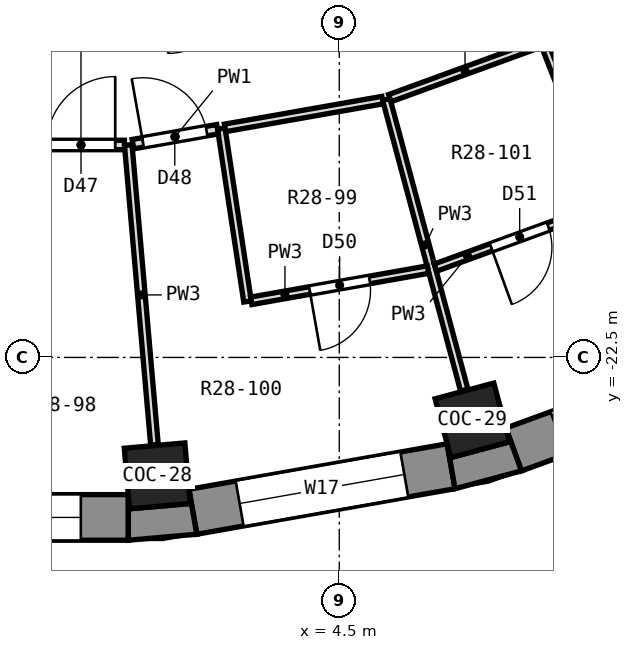
"""IFC4 building model, lengths in metres.
Left out: names, types, materials, properties, quantities, classifications, styles, units other than length and angle.
Written with IfcOpenShell. Run it as: python <this file> out.ifc"""

import sys

from ifc_helpers import new_model, si_unit, direction, frame, frame_2d, origin, origin_2d, place, context, subcontext, project, spatial, polyline, rectangle, outline, extrude, element, fill, save


model = new_model("IFC4")
c1 = context("Model", 3, precision=1e-05, world=origin(), true_north=direction((0.0, 1.0)))
c2 = subcontext(c1, "Body", "Model", "MODEL_VIEW")
j1 = project(units=[si_unit("LENGTHUNIT", "METRE"), si_unit("PLANEANGLEUNIT", "RADIAN")], contexts=[c1])
p1 = place(None, origin())
s1 = spatial("IfcSite", under=j1, at=p1, CompositionType="ELEMENT")
p2 = place(p1, origin())
s2 = spatial("IfcBuilding", under=s1, at=p2, CompositionType="ELEMENT")
p3 = place(p2, frame((0.0, 0.0, 190.5)))
s3 = spatial("IfcBuildingStorey", under=s2, at=p3, CompositionType="ELEMENT", Elevation=190.5)
for number, where, z_axis, x_axis in (
    (1, (2.105, -24.058, 0.0), (0.0, 0.0, 1.0), (0.087, -0.996, 0.0)),
    (2, (6.25, -23.327, 0.0), (0.0, 0.0, 1.0), (0.259, -0.966, 0.0)),
):
    element("IfcColumn", number, at=place(p3, frame(where, z_axis=z_axis, x_axis=x_axis)), inside=s3, PredefinedType="COLUMN", context=c2, shape_type="SweptSolid", body=[
        extrude(rectangle(XDim=0.8, YDim=0.8, at=origin_2d()), origin(), (0.0, 0.0, 1.0), 3.3),
    ])
p4 = place(p3, frame((-1.725, -24.605, 0.0), z_axis=(0.0, 0.0, 1.0), x_axis=(1.0, 0.0, 0.0)))
e3 = element("IfcWall", 3, at=p4, inside=s3, PredefinedType="SOLIDWALL", context=c2, shape_type="SweptSolid", body=[
    extrude(rectangle(XDim=3.45, YDim=0.6, at=frame_2d((1.725, 0.0))), origin(), (0.0, 0.0, 1.0), 2.85),
])
p5 = place(p4, frame((0.625, 0.0, 0.9)))
e4 = element("IfcOpeningElement", 4, at=p5, cuts=e3, PredefinedType="OPENING", context=c2, shape_type="SweptSolid", body=[
    extrude(rectangle(XDim=2.2, YDim=1.8, at=frame_2d((1.1, 0.9))), frame((0.0, 0.312, 0.0), z_axis=(0.0, -1.0, 0.0), x_axis=(1.0, 0.0, 0.0)), (0.0, 0.0, 1.0), 0.624),
])
p6 = place(p3, frame((2.574, -24.531, 0.0), z_axis=(0.0, 0.0, 1.0), x_axis=(0.984814892183, 0.173607684551, 0.0)))
e5 = element("IfcWall", 5, at=p6, inside=s3, PredefinedType="SOLIDWALL", context=c2, shape_type="SweptSolid", body=[
    extrude(rectangle(XDim=3.45, YDim=0.6, at=frame_2d((1.725, 0.0))), origin(), (0.0, 0.0, 1.0), 2.85),
])
p7 = place(p6, frame((0.625, 0.0, 0.9)))
e6 = element("IfcOpeningElement", 6, at=p7, cuts=e5, PredefinedType="OPENING", context=c2, shape_type="SweptSolid", body=[
    extrude(rectangle(XDim=2.2, YDim=1.8, at=frame_2d((1.1, 0.9))), frame((0.0, 0.312, 0.0), z_axis=(0.0, -1.0, 0.0), x_axis=(1.0, 0.0, 0.0)), (0.0, 0.0, 1.0), 0.624),
])
p8 = place(p3, frame((6.794, -23.711, 0.0), z_axis=(0.0, 0.0, 1.0), x_axis=(0.93968799822, 0.342032843455, 0.0)))
e7 = element("IfcWall", 7, at=p8, inside=s3, PredefinedType="SOLIDWALL", context=c2, shape_type="SweptSolid", body=[
    extrude(rectangle(XDim=3.45, YDim=0.6, at=frame_2d((1.725, 0.0))), origin(), (0.0, 0.0, 1.0), 2.85),
])
p9 = place(p8, frame((0.625, 0.0, 0.9)))
e8 = element("IfcOpeningElement", 8, at=p9, cuts=e7, PredefinedType="OPENING", context=c2, shape_type="SweptSolid", body=[
    extrude(rectangle(XDim=2.2, YDim=1.8, at=frame_2d((1.1, 0.9))), frame((0.0, 0.312, 0.0), z_axis=(0.0, -1.0, 0.0), x_axis=(1.0, 0.0, 0.0)), (0.0, 0.0, 1.0), 0.624),
])
p10 = place(p3, origin())
e9 = element("IfcWall", 9, at=p10, inside=s3, PredefinedType="SOLIDWALL", context=c2, shape_type="SweptSolid", body=[
    extrude(outline(polyline([(1.725, -24.905), (2.626, -24.826), (2.522, -24.235), (2.538, -24.422), (1.741, -24.491), (1.725, -24.305), (1.725, -24.905)])), origin(), (0.0, 0.0, 1.0), 2.85),
])
p11 = place(p3, origin())
e10 = element("IfcWall", 10, at=p11, inside=s3, PredefinedType="SOLIDWALL", context=c2, shape_type="SweptSolid", body=[
    extrude(outline(polyline([(6.023, -24.227), (6.897, -23.993), (6.692, -23.429), (6.74, -23.61), (5.968, -23.817), (5.919, -23.636), (6.023, -24.227)])), origin(), (0.0, 0.0, 1.0), 2.85),
])
p12 = place(p3, frame((1.724, -19.705, 0.0), z_axis=(0.0, 0.0, 1.0), x_axis=(0.087060633562, -0.996203014492, 0.0)))
e11 = element("IfcWall", 11, at=p12, inside=s3, PredefinedType="PARTITIONING", context=c2, shape_type="SweptSolid", body=[
    extrude(rectangle(XDim=3.96, YDim=0.1, at=frame_2d((1.98, 0.0))), origin(), (0.0, 0.0, 1.0), 2.85),
])
p13 = place(p3, frame((2.948, -19.489, 0.0), z_axis=(0.0, 0.0, 1.0), x_axis=(0.149927962289, -0.98869692329, 0.0)))
e12 = element("IfcWall", 12, at=p13, inside=s3, PredefinedType="PARTITIONING", context=c2, shape_type="SweptSolid", body=[
    extrude(rectangle(XDim=2.301, YDim=0.1, at=frame_2d((1.15, 0.0))), origin(), (0.0, 0.0, 1.0), 2.85),
])
p14 = place(p3, frame((5.119, -19.106, 0.0), z_axis=(0.0, 0.0, 1.0), x_axis=(0.259051417791, -0.965863532255, 0.0)))
e13 = element("IfcWall", 13, at=p14, inside=s3, PredefinedType="PARTITIONING", context=c2, shape_type="SweptSolid", body=[
    extrude(rectangle(XDim=3.96, YDim=0.1, at=frame_2d((1.98, 0.0))), origin(), (0.0, 0.0, 1.0), 2.85),
])
p15 = place(p3, frame((7.191, -18.352, 0.0), z_axis=(0.0, 0.0, 1.0), x_axis=(0.364775478286, -0.931095510912, 0.0)))
e14 = element("IfcWall", 14, at=p15, inside=s3, PredefinedType="PARTITIONING", context=c2, shape_type="SweptSolid", body=[
    extrude(rectangle(XDim=2.3, YDim=0.1, at=frame_2d((1.15, 0.0))), origin(), (0.0, 0.0, 1.0), 2.85),
])
p16 = place(p3, frame((6.645, -14.249, 0.0), z_axis=(0.0, 0.0, 1.0), x_axis=(0.422700425591, -0.90626946887, 0.0)))
e15 = element("IfcWall", 15, at=p16, inside=s3, PredefinedType="PARTITIONING", context=c2, shape_type="SweptSolid", body=[
    extrude(rectangle(XDim=8.018, YDim=0.15, at=frame_2d((4.009, 0.0))), origin(), (0.0, 0.0, 1.0), 2.85),
])
p17 = place(p16, frame((2.002, 0.0, 0.0)))
e16 = element("IfcOpeningElement", 16, at=p17, cuts=e15, PredefinedType="OPENING", context=c2, shape_type="SweptSolid", body=[
    extrude(rectangle(XDim=1.0, YDim=2.1, at=frame_2d((0.5, 1.05))), frame((0.0, 0.087, 0.0), z_axis=(0.0, -1.0, 0.0), x_axis=(1.0, 0.0, 0.0)), (0.0, 0.0, 1.0), 0.174),
])
p18 = place(p3, frame((0.531, -19.705, 0.0), z_axis=(0.0, 0.0, 1.0), x_axis=(1.0, 0.0, 0.0)))
e17 = element("IfcWall", 17, at=p18, inside=s3, PredefinedType="PARTITIONING", context=c2, shape_type="SweptSolid", body=[
    extrude(rectangle(XDim=1.143, YDim=0.125, at=frame_2d((0.572, 0.0))), origin(), (0.0, 0.0, 1.0), 2.85),
])
p19 = place(p18, frame((0.122, 0.0, 0.0)))
e18 = element("IfcOpeningElement", 18, at=p19, cuts=e17, PredefinedType="OPENING", context=c2, shape_type="SweptSolid", body=[
    extrude(rectangle(XDim=0.9, YDim=2.1, at=frame_2d((0.45, 1.05))), frame((0.0, 0.074, 0.0), z_axis=(0.0, -1.0, 0.0), x_axis=(1.0, 0.0, 0.0)), (0.0, 0.0, 1.0), 0.149),
])
p20 = place(p3, frame((3.342, -21.755, 0.0), z_axis=(0.0, 0.0, 1.0), x_axis=(0.984763777024, 0.173897393486, 0.0)))
e19 = element("IfcWall", 19, at=p20, inside=s3, PredefinedType="PARTITIONING", context=c2, shape_type="SweptSolid", body=[
    extrude(rectangle(XDim=2.361, YDim=0.1, at=frame_2d((1.181, 0.0))), origin(), (0.0, 0.0, 1.0), 2.85),
])
p21 = place(p20, frame((0.781, 0.0, 0.0)))
e20 = element("IfcOpeningElement", 20, at=p21, cuts=e19, PredefinedType="OPENING", context=c2, shape_type="SweptSolid", body=[
    extrude(rectangle(XDim=0.8, YDim=2.1, at=frame_2d((0.4, 1.05))), frame((0.0, 0.062, 0.0), z_axis=(0.0, -1.0, 0.0), x_axis=(1.0, 0.0, 0.0)), (0.0, 0.0, 1.0), 0.124),
])
p22 = place(p3, frame((2.997, -19.48, 0.0), z_axis=(0.0, 0.0, 1.0), x_axis=(0.984804573467, 0.173666208797, 0.0)))
e21 = element("IfcWall", 21, at=p22, inside=s3, PredefinedType="PARTITIONING", context=c2, shape_type="SweptSolid", body=[
    extrude(rectangle(XDim=2.104, YDim=0.1, at=frame_2d((1.052, 0.0))), origin(), (0.0, 0.0, 1.0), 2.85),
])
p23 = place(p3, frame((1.786, -19.694, 0.0), z_axis=(0.0, 0.0, 1.0), x_axis=(0.984803124218, 0.17367442682, 0.0)))
e22 = element("IfcWall", 22, at=p23, inside=s3, PredefinedType="PARTITIONING", context=c2, shape_type="SweptSolid", body=[
    extrude(rectangle(XDim=1.13, YDim=0.125, at=frame_2d((0.565, 0.0))), origin(), (0.0, 0.0, 1.0), 2.85),
])
p24 = place(p23, frame((0.134, 0.0, 0.0)))
e23 = element("IfcOpeningElement", 23, at=p24, cuts=e22, PredefinedType="OPENING", context=c2, shape_type="SweptSolid", body=[
    extrude(rectangle(XDim=0.85, YDim=2.1, at=frame_2d((0.425, 1.05))), frame((0.0, 0.074, 0.0), z_axis=(0.0, -1.0, 0.0), x_axis=(1.0, 0.0, 0.0)), (0.0, 0.0, 1.0), 0.149),
])
p25 = place(p3, frame((5.764, -21.319, 0.0), z_axis=(0.0, 0.0, 1.0), x_axis=(0.939663558851, 0.342099979782, 0.0)))
e24 = element("IfcWall", 24, at=p25, inside=s3, PredefinedType="PARTITIONING", context=c2, shape_type="SweptSolid", body=[
    extrude(rectangle(XDim=2.362, YDim=0.1, at=frame_2d((1.181, 0.0))), origin(), (0.0, 0.0, 1.0), 2.85),
])
p26 = place(p25, frame((0.781, 0.0, 0.0)))
e25 = element("IfcOpeningElement", 25, at=p26, cuts=e24, PredefinedType="OPENING", context=c2, shape_type="SweptSolid", body=[
    extrude(rectangle(XDim=0.8, YDim=2.1, at=frame_2d((0.4, 1.05))), frame((0.0, 0.062, 0.0), z_axis=(0.0, -1.0, 0.0), x_axis=(1.0, 0.0, 0.0)), (0.0, 0.0, 1.0), 0.124),
])
p27 = place(p3, frame((5.166, -19.089, 0.0), z_axis=(0.0, 0.0, 1.0), x_axis=(0.939725675468, 0.341929312674, 0.0)))
e26 = element("IfcWall", 26, at=p27, inside=s3, PredefinedType="PARTITIONING", context=c2, shape_type="SweptSolid", body=[
    extrude(rectangle(XDim=2.105, YDim=0.1, at=frame_2d((1.052, 0.0))), origin(), (0.0, 0.0, 1.0), 2.85),
])
p28 = place(p5, origin())
e27 = element("IfcWindow", 27, at=p28, inside=s3, PartitioningType="SINGLE_PANEL", PredefinedType="WINDOW", context=c2, shape_type="SweptSolid", body=[
    extrude(rectangle(XDim=2.2, YDim=1.8, at=frame_2d((1.1, 0.9))), frame((0.0, 0.18, 0.0), z_axis=(0.0, -1.0, 0.0), x_axis=(1.0, 0.0, 0.0)), (0.0, 0.0, 1.0), 0.06),
])
fill(e4, e27)
p29 = place(p7, origin())
e28 = element("IfcWindow", 28, at=p29, inside=s3, PartitioningType="SINGLE_PANEL", PredefinedType="WINDOW", context=c2, shape_type="SweptSolid", body=[
    extrude(rectangle(XDim=2.2, YDim=1.8, at=frame_2d((1.1, 0.9))), frame((0.0, 0.18, 0.0), z_axis=(0.0, -1.0, 0.0), x_axis=(1.0, 0.0, 0.0)), (0.0, 0.0, 1.0), 0.06),
])
fill(e6, e28)
p30 = place(p19, origin())
e29 = element("IfcDoor", 29, at=p30, inside=s3, OperationType="SINGLE_SWING_RIGHT", PredefinedType="DOOR", context=c2, shape_type="SweptSolid", body=[
    extrude(rectangle(XDim=0.9, YDim=2.1, at=frame_2d((0.45, 1.05))), frame((0.0, 0.025, 0.0), z_axis=(0.0, -1.0, 0.0), x_axis=(1.0, 0.0, 0.0)), (0.0, 0.0, 1.0), 0.05),
])
fill(e18, e29)
p31 = place(p24, origin())
e30 = element("IfcDoor", 30, at=p31, inside=s3, OperationType="SINGLE_SWING_LEFT", PredefinedType="DOOR", context=c2, shape_type="SweptSolid", body=[
    extrude(rectangle(XDim=0.85, YDim=2.1, at=frame_2d((0.425, 1.05))), frame((0.0, 0.025, 0.0), z_axis=(0.0, -1.0, 0.0), x_axis=(1.0, 0.0, 0.0)), (0.0, 0.0, 1.0), 0.05),
])
fill(e23, e30)
p32 = place(p21, frame((0.8, 0.0, 0.0), z_axis=(0.0, 0.0, 1.0), x_axis=(-1.0, 0.0, 0.0)))
e31 = element("IfcDoor", 31, at=p32, inside=s3, OperationType="SINGLE_SWING_RIGHT", PredefinedType="DOOR", context=c2, shape_type="SweptSolid", body=[
    extrude(rectangle(XDim=0.8, YDim=2.1, at=frame_2d((0.4, 1.05))), frame((0.0, 0.025, 0.0), z_axis=(0.0, -1.0, 0.0), x_axis=(1.0, 0.0, 0.0)), (0.0, 0.0, 1.0), 0.05),
])
fill(e20, e31)
p33 = place(p26, frame((0.8, 0.0, 0.0), z_axis=(0.0, 0.0, 1.0), x_axis=(-1.0, 0.0, 0.0)))
e32 = element("IfcDoor", 32, at=p33, inside=s3, OperationType="SINGLE_SWING_RIGHT", PredefinedType="DOOR", context=c2, shape_type="SweptSolid", body=[
    extrude(rectangle(XDim=0.8, YDim=2.1, at=frame_2d((0.4, 1.05))), frame((0.0, 0.025, 0.0), z_axis=(0.0, -1.0, 0.0), x_axis=(1.0, 0.0, 0.0)), (0.0, 0.0, 1.0), 0.05),
])
fill(e25, e32)
save(model, sys.argv[1])
